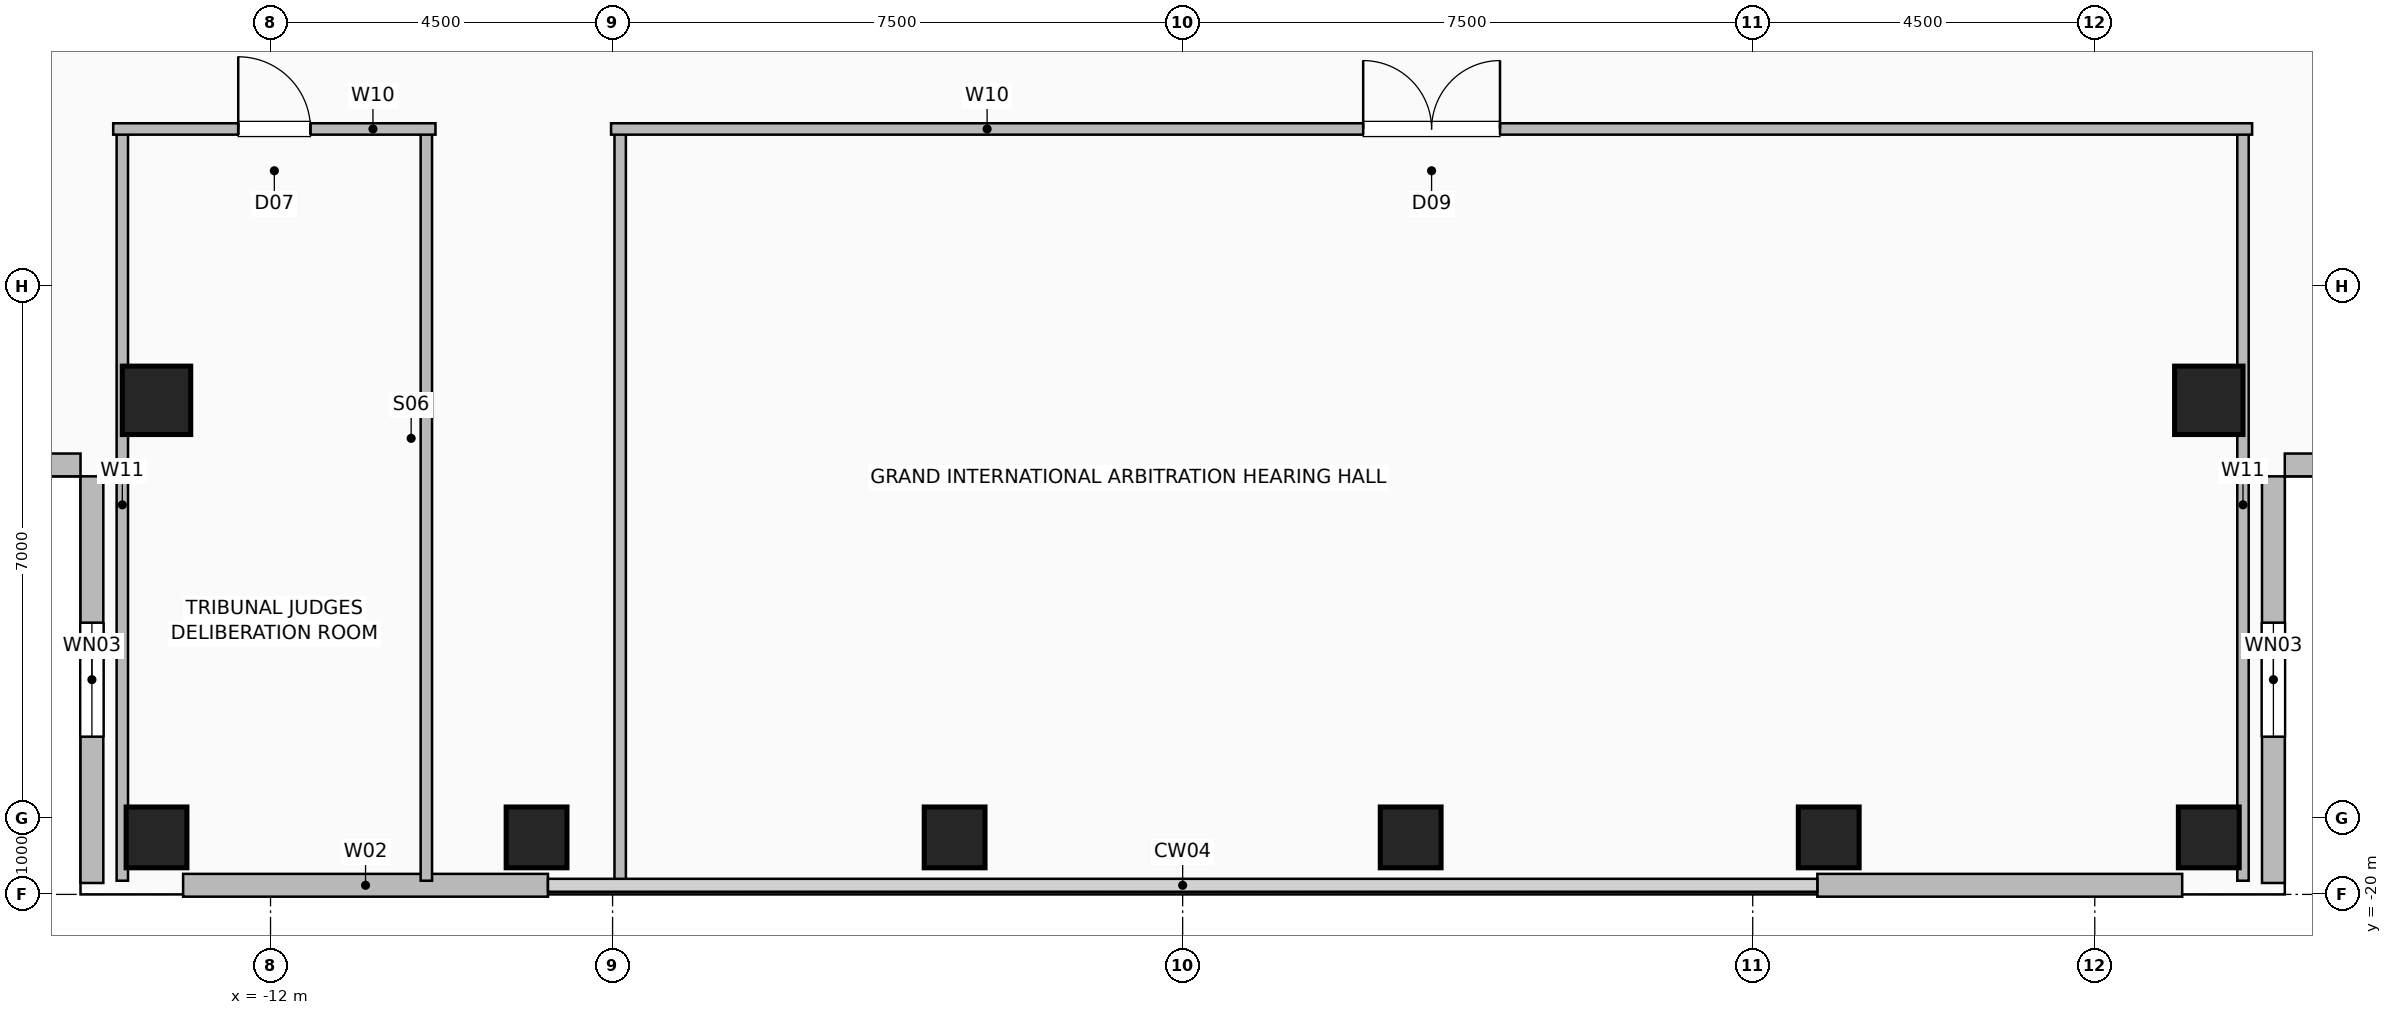
"""IFC4 building model, lengths in metres.
Left out: names, types, materials, properties, quantities, classifications, styles, units other than length and angle.
Written with IfcOpenShell. Run it as: python <this file> out.ifc"""

import sys

from ifc_helpers import new_model, si_unit, direction, frame, frame_2d, origin, origin_2d, place, context, subcontext, project, spatial, rectangle, hollow_rectangle, extrude, element, fill, save


model = new_model("IFC4")
c1 = context("Model", 3, precision=1e-05, world=origin(), true_north=direction((0.0, 1.0)))
c2 = subcontext(c1, "Body", "Model", "MODEL_VIEW")
j1 = project(units=[si_unit("LENGTHUNIT", "METRE"), si_unit("PLANEANGLEUNIT", "RADIAN")], contexts=[c1])
p1 = place(None, origin())
s1 = spatial("IfcSite", under=j1, at=p1, CompositionType="ELEMENT")
p2 = place(p1, origin())
s2 = spatial("IfcBuilding", under=s1, at=p2, CompositionType="ELEMENT")
p3 = place(p2, frame((0.0, 0.0, 180.6)))
s3 = spatial("IfcBuildingStorey", under=s2, at=p3, CompositionType="ELEMENT", Elevation=180.6)
for number, where, z_axis, x_axis in (
    (1, (-13.5, -19.25, 0.0), (0.0, 0.0, 1.0), (1.0, 0.0, 0.0)),
    (2, (-8.5, -19.25, 0.0), (0.0, 0.0, 1.0), (1.0, 0.0, 0.0)),
    (3, (-3.0, -19.25, 0.0), (0.0, 0.0, 1.0), (1.0, 0.0, 0.0)),
    (4, (3.0, -19.25, 0.0), (0.0, 0.0, 1.0), (1.0, 0.0, 0.0)),
    (5, (8.5, -19.25, 0.0), (0.0, 0.0, 1.0), (1.0, 0.0, 0.0)),
    (6, (13.5, -19.25, 0.0), (0.0, 0.0, 1.0), (1.0, 0.0, 0.0)),
):
    element("IfcColumn", number, at=place(p3, frame(where, z_axis=z_axis, x_axis=x_axis)), inside=s3, PredefinedType="COLUMN", context=c2, shape_type="SweptSolid", body=[
        extrude(hollow_rectangle(XDim=0.8, YDim=0.8, WallThickness=0.04, at=origin_2d()), origin(), (0.0, 0.0, 1.0), 3.6),
    ])
for number, where, z_axis, x_axis in (
    (7, (-13.5, -13.5, 0.0), (0.0, 0.0, 1.0), (1.0, 0.0, 0.0)),
    (8, (13.5, -13.5, 0.0), (0.0, 0.0, 1.0), (1.0, 0.0, 0.0)),
):
    element("IfcColumn", number, at=place(p3, frame(where, z_axis=z_axis, x_axis=x_axis)), inside=s3, PredefinedType="COLUMN", context=c2, shape_type="SweptSolid", body=[
        extrude(hollow_rectangle(XDim=0.9, YDim=0.9, WallThickness=0.045, at=origin_2d()), origin(), (0.0, 0.0, 1.0), 3.6),
    ])
for number, where, z_axis, x_axis in (
    (9, (-13.15, -19.88, 0.0), (0.0, 0.0, 1.0), (1.0, 0.0, 0.0)),
    (10, (8.35, -19.88, 0.0), (0.0, 0.0, 1.0), (1.0, 0.0, 0.0)),
):
    element("IfcWall", number, at=place(p3, frame(where, z_axis=z_axis, x_axis=x_axis)), inside=s3, PredefinedType="SOLIDWALL", context=c2, shape_type="SweptSolid", body=[
        extrude(rectangle(XDim=4.8, YDim=0.3, at=frame_2d((2.4, 0.0))), origin(), (0.0, 0.0, 1.0), 3.36),
    ])
p4 = place(p3, frame((-14.35, -19.85, 0.0), z_axis=(0.0, 0.0, 1.0), x_axis=(0.0, 1.0, 0.0)))
e11 = element("IfcWall", 11, at=p4, inside=s3, PredefinedType="SOLIDWALL", context=c2, shape_type="SweptSolid", body=[
    extrude(rectangle(XDim=5.35, YDim=0.3, at=frame_2d((2.675, 0.0))), origin(), (0.0, 0.0, 1.0), 3.36),
])
p5 = place(p4, frame((1.925, 0.0, 0.9)))
e12 = element("IfcOpeningElement", 12, at=p5, cuts=e11, PredefinedType="OPENING", context=c2, shape_type="SweptSolid", body=[
    extrude(rectangle(XDim=1.5, YDim=1.8, at=frame_2d((0.75, 0.9))), frame((0.0, 0.16, 0.0), z_axis=(0.0, -1.0, 0.0), x_axis=(1.0, 0.0, 0.0)), (0.0, 0.0, 1.0), 0.32),
])
p6 = place(p3, frame((-19.85, -14.35, 0.0), z_axis=(0.0, 0.0, 1.0), x_axis=(1.0, 0.0, 0.0)))
e13 = element("IfcWall", 13, at=p6, inside=s3, PredefinedType="SOLIDWALL", context=c2, shape_type="SweptSolid", body=[
    extrude(rectangle(XDim=5.35, YDim=0.3, at=frame_2d((2.675, 0.0))), origin(), (0.0, 0.0, 1.0), 3.36),
])
p7 = place(p3, frame((14.35, -19.85, 0.0), z_axis=(0.0, 0.0, 1.0), x_axis=(0.0, 1.0, 0.0)))
e14 = element("IfcWall", 14, at=p7, inside=s3, PredefinedType="SOLIDWALL", context=c2, shape_type="SweptSolid", body=[
    extrude(rectangle(XDim=5.35, YDim=0.3, at=frame_2d((2.675, 0.0))), origin(), (0.0, 0.0, 1.0), 3.36),
])
p8 = place(p7, frame((1.925, 0.0, 0.9)))
e15 = element("IfcOpeningElement", 15, at=p8, cuts=e14, PredefinedType="OPENING", context=c2, shape_type="SweptSolid", body=[
    extrude(rectangle(XDim=1.5, YDim=1.8, at=frame_2d((0.75, 0.9))), frame((0.0, 0.16, 0.0), z_axis=(0.0, -1.0, 0.0), x_axis=(1.0, 0.0, 0.0)), (0.0, 0.0, 1.0), 0.32),
])
p9 = place(p3, frame((19.85, -14.35, 0.0), z_axis=(0.0, 0.0, 1.0), x_axis=(-1.0, 0.0, 0.0)))
e16 = element("IfcWall", 16, at=p9, inside=s3, PredefinedType="SOLIDWALL", context=c2, shape_type="SweptSolid", body=[
    extrude(rectangle(XDim=5.35, YDim=0.3, at=frame_2d((2.675, 0.0))), origin(), (0.0, 0.0, 1.0), 3.36),
])
for number, where, z_axis, x_axis in (
    (17, (-13.95, -19.82, 0.0), (0.0, 0.0, 1.0), (0.0, 1.0, 0.0)),
    (18, (-9.95, -19.82, 0.0), (0.0, 0.0, 1.0), (0.0, 1.0, 0.0)),
):
    element("IfcWall", number, at=place(p3, frame(where, z_axis=z_axis, x_axis=x_axis)), inside=s3, PredefinedType="PARTITIONING", context=c2, shape_type="SweptSolid", body=[
        extrude(rectangle(XDim=9.89, YDim=0.15, at=frame_2d((4.945, 0.0))), origin(), (0.0, 0.0, 1.0), 3.36),
    ])
p10 = place(p3, frame((-14.07, -9.93, 0.0), z_axis=(0.0, 0.0, 1.0), x_axis=(1.0, 0.0, 0.0)))
e19 = element("IfcWall", 19, at=p10, inside=s3, PredefinedType="PARTITIONING", context=c2, shape_type="SweptSolid", body=[
    extrude(rectangle(XDim=4.24, YDim=0.15, at=frame_2d((2.12, 0.0))), origin(), (0.0, 0.0, 1.0), 3.36),
])
p11 = place(p10, frame((1.645, 0.0, 0.0)))
e20 = element("IfcOpeningElement", 20, at=p11, cuts=e19, PredefinedType="OPENING", context=c2, shape_type="SweptSolid", body=[
    extrude(rectangle(XDim=0.95, YDim=2.06, at=frame_2d((0.475, 1.03))), frame((0.0, 0.085, 0.0), z_axis=(0.0, -1.0, 0.0), x_axis=(1.0, 0.0, 0.0)), (0.0, 0.0, 1.0), 0.17),
])
for number, where, z_axis, x_axis in (
    (21, (-7.4, -19.82, 0.0), (0.0, 0.0, 1.0), (0.0, 1.0, 0.0)),
    (22, (13.95, -19.82, 0.0), (0.0, 0.0, 1.0), (0.0, 1.0, 0.0)),
):
    element("IfcWall", number, at=place(p3, frame(where, z_axis=z_axis, x_axis=x_axis)), inside=s3, PredefinedType="PARTITIONING", context=c2, shape_type="SweptSolid", body=[
        extrude(rectangle(XDim=9.89, YDim=0.15, at=frame_2d((4.945, 0.0))), origin(), (0.0, 0.0, 1.0), 3.36),
    ])
p12 = place(p3, frame((-7.52, -9.93, 0.0), z_axis=(0.0, 0.0, 1.0), x_axis=(1.0, 0.0, 0.0)))
e23 = element("IfcWall", 23, at=p12, inside=s3, PredefinedType="PARTITIONING", context=c2, shape_type="SweptSolid", body=[
    extrude(rectangle(XDim=21.59, YDim=0.15, at=frame_2d((10.795, 0.0))), origin(), (0.0, 0.0, 1.0), 3.36),
])
p13 = place(p12, frame((9.895, 0.0, 0.0)))
e24 = element("IfcOpeningElement", 24, at=p13, cuts=e23, PredefinedType="OPENING", context=c2, shape_type="SweptSolid", body=[
    extrude(rectangle(XDim=1.8, YDim=2.08, at=frame_2d((0.9, 1.04))), frame((0.0, 0.085, 0.0), z_axis=(0.0, -1.0, 0.0), x_axis=(1.0, 0.0, 0.0)), (0.0, 0.0, 1.0), 0.17),
])
p14 = place(p5, origin())
e25 = element("IfcWindow", 25, at=p14, inside=s3, PartitioningType="SINGLE_PANEL", PredefinedType="WINDOW", context=c2, shape_type="SweptSolid", body=[
    extrude(rectangle(XDim=1.5, YDim=1.8, at=frame_2d((0.75, 0.9))), frame((0.0, 0.03, 0.0), z_axis=(0.0, -1.0, 0.0), x_axis=(1.0, 0.0, 0.0)), (0.0, 0.0, 1.0), 0.06),
])
fill(e12, e25)
p15 = place(p8, origin())
e26 = element("IfcWindow", 26, at=p15, inside=s3, PartitioningType="SINGLE_PANEL", PredefinedType="WINDOW", context=c2, shape_type="SweptSolid", body=[
    extrude(rectangle(XDim=1.5, YDim=1.8, at=frame_2d((0.75, 0.9))), frame((0.0, 0.03, 0.0), z_axis=(0.0, -1.0, 0.0), x_axis=(1.0, 0.0, 0.0)), (0.0, 0.0, 1.0), 0.06),
])
fill(e15, e26)
p16 = place(p11, origin())
e27 = element("IfcDoor", 27, at=p16, inside=s3, OperationType="SINGLE_SWING_LEFT", PredefinedType="DOOR", context=c2, shape_type="SweptSolid", body=[
    extrude(rectangle(XDim=0.95, YDim=2.06, at=frame_2d((0.475, 1.03))), frame((0.0, 0.025, 0.0), z_axis=(0.0, -1.0, 0.0), x_axis=(1.0, 0.0, 0.0)), (0.0, 0.0, 1.0), 0.05),
])
fill(e20, e27)
p17 = place(p13, origin())
e28 = element("IfcDoor", 28, at=p17, inside=s3, OperationType="DOUBLE_DOOR_SINGLE_SWING", PredefinedType="DOOR", context=c2, shape_type="SweptSolid", body=[
    extrude(rectangle(XDim=1.8, YDim=2.08, at=frame_2d((0.9, 1.04))), frame((0.0, 0.025, 0.0), z_axis=(0.0, -1.0, 0.0), x_axis=(1.0, 0.0, 0.0)), (0.0, 0.0, 1.0), 0.05),
])
fill(e24, e28)
save(model, sys.argv[1])
